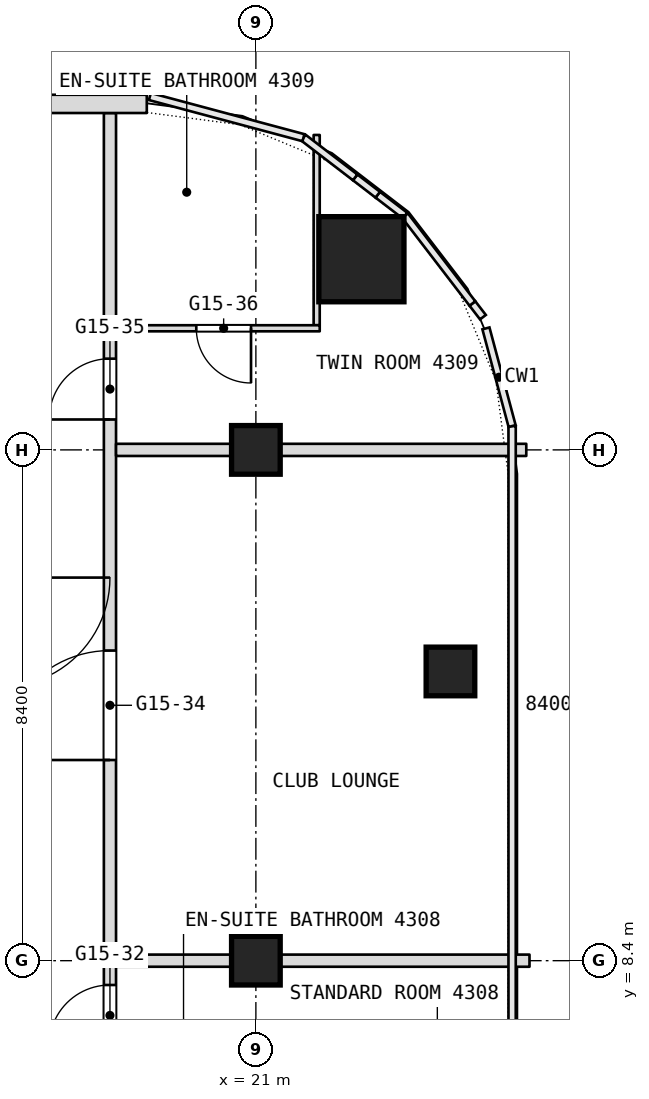
"""IFC4 building model, lengths in metres.
Left out: names, types, materials, properties, quantities, classifications, styles, units other than length and angle.
Written with IfcOpenShell. Run it as: python <this file> out.ifc"""

import sys

from ifc_helpers import new_model, si_unit, direction, frame, frame_2d, origin, origin_2d, place, context, subcontext, project, spatial, rectangle, extrude, element, fill, save


model = new_model("IFC4")
c1 = context("Model", 3, precision=1e-05, world=origin(), true_north=direction((0.0, 1.0)))
c2 = subcontext(c1, "Body", "Model", "MODEL_VIEW")
j1 = project(units=[si_unit("LENGTHUNIT", "METRE"), si_unit("PLANEANGLEUNIT", "RADIAN")], contexts=[c1])
p1 = place(None, origin())
s1 = spatial("IfcSite", under=j1, at=p1, CompositionType="ELEMENT")
p2 = place(p1, origin())
s2 = spatial("IfcBuilding", under=s1, at=p2, CompositionType="ELEMENT")
p3 = place(p2, frame((0.0, 0.0, 191.3)))
s3 = spatial("IfcBuildingStorey", under=s2, at=p3, CompositionType="ELEMENT", Elevation=191.3)
p4 = place(p3, frame((22.736, 19.936, 0.0), z_axis=(0.0, 0.0, 1.0), x_axis=(1.0, 0.0, 0.0)))
e1 = element("IfcColumn", 1, at=p4, inside=s3, PredefinedType="COLUMN", context=c2, shape_type="SweptSolid", body=[
    extrude(rectangle(XDim=1.4, YDim=1.4, at=origin_2d()), origin(), (0.0, 0.0, 1.0), 3.6),
])
for number, where, z_axis, x_axis in (
    (2, (21.0, 8.4, 0.0), (0.0, 0.0, 1.0), (1.0, 0.0, 0.0)),
    (3, (21.0, 16.8, 0.0), (0.0, 0.0, 1.0), (1.0, 0.0, 0.0)),
    (4, (24.2, 13.156, 0.0), (0.0, 0.0, 1.0), (1.0, 0.0, 0.0)),
):
    element("IfcColumn", number, at=place(p3, frame(where, z_axis=z_axis, x_axis=x_axis)), inside=s3, PredefinedType="COLUMN", context=c2, shape_type="SweptSolid", body=[
        extrude(rectangle(XDim=0.8, YDim=0.8, at=origin_2d()), origin(), (0.0, 0.0, 1.0), 3.6),
    ])
p5 = place(p3, frame((22.0, 18.85, 0.0), z_axis=(0.0, 0.0, 1.0), x_axis=(0.0, 1.0, 0.0)))
e5 = element("IfcWall", 5, at=p5, inside=s3, PredefinedType="PARTITIONING", context=c2, shape_type="SweptSolid", body=[
    extrude(rectangle(XDim=3.129, YDim=0.1, at=frame_2d((1.564, 0.0))), origin(), (0.0, 0.0, 1.0), 3.34),
])
p6 = place(p3, frame((18.6, -26.751, 0.0), z_axis=(0.0, 0.0, 1.0), x_axis=(0.0, 1.0, 0.0)))
e6 = element("IfcWall", 6, at=p6, inside=s3, PredefinedType="PARTITIONING", context=c2, shape_type="SweptSolid", body=[
    extrude(rectangle(XDim=49.091, YDim=0.2, at=frame_2d((24.545, 0.0))), origin(), (0.0, 0.0, 1.0), 3.34),
])
p7 = place(p6, frame((3.413, 0.0, 0.0)))
e7 = element("IfcOpeningElement", 7, at=p7, cuts=e6, PredefinedType="OPENING", context=c2, shape_type="SweptSolid", body=[
    extrude(rectangle(XDim=1.0, YDim=2.1, at=frame_2d((0.5, 1.05))), frame((0.0, 0.1, 0.0), z_axis=(0.0, -1.0, 0.0), x_axis=(1.0, 0.0, 0.0)), (0.0, 0.0, 1.0), 0.2),
])
p8 = place(p6, frame((5.838, 0.0, 0.0)))
e8 = element("IfcOpeningElement", 8, at=p8, cuts=e6, PredefinedType="OPENING", context=c2, shape_type="SweptSolid", body=[
    extrude(rectangle(XDim=1.0, YDim=2.1, at=frame_2d((0.5, 1.05))), frame((0.0, 0.1, 0.0), z_axis=(0.0, -1.0, 0.0), x_axis=(1.0, 0.0, 0.0)), (0.0, 0.0, 1.0), 0.2),
])
p9 = place(p6, frame((10.351, 0.0, 0.0)))
e9 = element("IfcOpeningElement", 9, at=p9, cuts=e6, PredefinedType="OPENING", context=c2, shape_type="SweptSolid", body=[
    extrude(rectangle(XDim=1.0, YDim=2.1, at=frame_2d((0.5, 1.05))), frame((0.0, 0.1, 0.0), z_axis=(0.0, -1.0, 0.0), x_axis=(1.0, 0.0, 0.0)), (0.0, 0.0, 1.0), 0.2),
])
p10 = place(p6, frame((16.951, 0.0, 0.0)))
e10 = element("IfcOpeningElement", 10, at=p10, cuts=e6, PredefinedType="OPENING", context=c2, shape_type="SweptSolid", body=[
    extrude(rectangle(XDim=1.0, YDim=2.1, at=frame_2d((0.5, 1.05))), frame((0.0, 0.1, 0.0), z_axis=(0.0, -1.0, 0.0), x_axis=(1.0, 0.0, 0.0)), (0.0, 0.0, 1.0), 0.2),
])
p11 = place(p6, frame((21.151, 0.0, 0.0)))
e11 = element("IfcOpeningElement", 11, at=p11, cuts=e6, PredefinedType="OPENING", context=c2, shape_type="SweptSolid", body=[
    extrude(rectangle(XDim=1.0, YDim=2.1, at=frame_2d((0.5, 1.05))), frame((0.0, 0.1, 0.0), z_axis=(0.0, -1.0, 0.0), x_axis=(1.0, 0.0, 0.0)), (0.0, 0.0, 1.0), 0.2),
])
p12 = place(p6, frame((22.951, 0.0, 0.0)))
e12 = element("IfcOpeningElement", 12, at=p12, cuts=e6, PredefinedType="OPENING", context=c2, shape_type="SweptSolid", body=[
    extrude(rectangle(XDim=1.0, YDim=2.1, at=frame_2d((0.5, 1.05))), frame((0.0, 0.1, 0.0), z_axis=(0.0, -1.0, 0.0), x_axis=(1.0, 0.0, 0.0)), (0.0, 0.0, 1.0), 0.2),
])
p13 = place(p6, frame((27.151, 0.0, 0.0)))
e13 = element("IfcOpeningElement", 13, at=p13, cuts=e6, PredefinedType="OPENING", context=c2, shape_type="SweptSolid", body=[
    extrude(rectangle(XDim=1.0, YDim=2.1, at=frame_2d((0.5, 1.05))), frame((0.0, 0.1, 0.0), z_axis=(0.0, -1.0, 0.0), x_axis=(1.0, 0.0, 0.0)), (0.0, 0.0, 1.0), 0.2),
])
p14 = place(p6, frame((33.751, 0.0, 0.0)))
e14 = element("IfcOpeningElement", 14, at=p14, cuts=e6, PredefinedType="OPENING", context=c2, shape_type="SweptSolid", body=[
    extrude(rectangle(XDim=1.0, YDim=2.1, at=frame_2d((0.5, 1.05))), frame((0.0, 0.1, 0.0), z_axis=(0.0, -1.0, 0.0), x_axis=(1.0, 0.0, 0.0)), (0.0, 0.0, 1.0), 0.2),
])
p15 = place(p6, frame((38.451, 0.0, 0.0)))
e15 = element("IfcOpeningElement", 15, at=p15, cuts=e6, PredefinedType="OPENING", context=c2, shape_type="SweptSolid", body=[
    extrude(rectangle(XDim=1.8, YDim=2.1, at=frame_2d((0.9, 1.05))), frame((0.0, 0.1, 0.0), z_axis=(0.0, -1.0, 0.0), x_axis=(1.0, 0.0, 0.0)), (0.0, 0.0, 1.0), 0.2),
])
p16 = place(p6, frame((44.051, 0.0, 0.0)))
e16 = element("IfcOpeningElement", 16, at=p16, cuts=e6, PredefinedType="OPENING", context=c2, shape_type="SweptSolid", body=[
    extrude(rectangle(XDim=1.0, YDim=2.1, at=frame_2d((0.5, 1.05))), frame((0.0, 0.1, 0.0), z_axis=(0.0, -1.0, 0.0), x_axis=(1.0, 0.0, 0.0)), (0.0, 0.0, 1.0), 0.2),
])
p17 = place(p3, frame((18.7, 8.4, 0.0), z_axis=(0.0, 0.0, 1.0), x_axis=(1.0, 0.0, 0.0)))
e17 = element("IfcWall", 17, at=p17, inside=s3, PredefinedType="PARTITIONING", context=c2, shape_type="SweptSolid", body=[
    extrude(rectangle(XDim=6.8, YDim=0.2, at=frame_2d((3.4, 0.0))), origin(), (0.0, 0.0, 1.0), 2.94),
])
p18 = place(p3, frame((18.7, 16.8, 0.0), z_axis=(0.0, 0.0, 1.0), x_axis=(1.0, 0.0, 0.0)))
e18 = element("IfcWall", 18, at=p18, inside=s3, PredefinedType="PARTITIONING", context=c2, shape_type="SweptSolid", body=[
    extrude(rectangle(XDim=6.747, YDim=0.2, at=frame_2d((3.374, 0.0))), origin(), (0.0, 0.0, 1.0), 2.94),
])
p19 = place(p3, frame((18.7, 18.8, 0.0), z_axis=(0.0, 0.0, 1.0), x_axis=(1.0, 0.0, 0.0)))
e19 = element("IfcWall", 19, at=p19, inside=s3, PredefinedType="PARTITIONING", context=c2, shape_type="SweptSolid", body=[
    extrude(rectangle(XDim=3.35, YDim=0.1, at=frame_2d((1.675, 0.0))), origin(), (0.0, 0.0, 1.0), 3.34),
])
p20 = place(p19, frame((1.32, 0.0, 0.0)))
e20 = element("IfcOpeningElement", 20, at=p20, cuts=e19, PredefinedType="OPENING", context=c2, shape_type="SweptSolid", body=[
    extrude(rectangle(XDim=0.9, YDim=2.1, at=frame_2d((0.45, 1.05))), frame((0.0, 0.05, 0.0), z_axis=(0.0, -1.0, 0.0), x_axis=(1.0, 0.0, 0.0)), (0.0, 0.0, 1.0), 0.1),
])
p21 = place(p3, frame((19.206, 22.49, 0.0), z_axis=(0.0, 0.0, 1.0), x_axis=(-1.0, 0.0, 0.0)))
e21 = element("IfcWall", 21, at=p21, inside=s3, PredefinedType="NOTDEFINED", context=c2, shape_type="SweptSolid", body=[
    extrude(rectangle(XDim=38.412, YDim=0.3, at=frame_2d((19.206, 0.0))), origin(), (0.0, 0.0, 1.0), 3.6),
])
p22 = place(p21, frame((3.306, 0.0, 0.9)))
e22 = element("IfcOpeningElement", 22, at=p22, cuts=e21, PredefinedType="OPENING", context=c2, shape_type="SweptSolid", body=[
    extrude(rectangle(XDim=2.4, YDim=2.1, at=frame_2d((1.2, 1.05))), frame((0.0, 0.15, 0.0), z_axis=(0.0, -1.0, 0.0), x_axis=(1.0, 0.0, 0.0)), (0.0, 0.0, 1.0), 0.3),
])
p23 = place(p21, frame((7.506, 0.0, 0.9)))
e23 = element("IfcOpeningElement", 23, at=p23, cuts=e21, PredefinedType="OPENING", context=c2, shape_type="SweptSolid", body=[
    extrude(rectangle(XDim=2.4, YDim=2.1, at=frame_2d((1.2, 1.05))), frame((0.0, 0.15, 0.0), z_axis=(0.0, -1.0, 0.0), x_axis=(1.0, 0.0, 0.0)), (0.0, 0.0, 1.0), 0.3),
])
p24 = place(p21, frame((11.706, 0.0, 0.9)))
e24 = element("IfcOpeningElement", 24, at=p24, cuts=e21, PredefinedType="OPENING", context=c2, shape_type="SweptSolid", body=[
    extrude(rectangle(XDim=2.4, YDim=2.1, at=frame_2d((1.2, 1.05))), frame((0.0, 0.15, 0.0), z_axis=(0.0, -1.0, 0.0), x_axis=(1.0, 0.0, 0.0)), (0.0, 0.0, 1.0), 0.3),
])
p25 = place(p21, frame((15.906, 0.0, 0.9)))
e25 = element("IfcOpeningElement", 25, at=p25, cuts=e21, PredefinedType="OPENING", context=c2, shape_type="SweptSolid", body=[
    extrude(rectangle(XDim=2.4, YDim=2.1, at=frame_2d((1.2, 1.05))), frame((0.0, 0.15, 0.0), z_axis=(0.0, -1.0, 0.0), x_axis=(1.0, 0.0, 0.0)), (0.0, 0.0, 1.0), 0.3),
])
p26 = place(p21, frame((20.106, 0.0, 0.9)))
e26 = element("IfcOpeningElement", 26, at=p26, cuts=e21, PredefinedType="OPENING", context=c2, shape_type="SweptSolid", body=[
    extrude(rectangle(XDim=2.4, YDim=2.1, at=frame_2d((1.2, 1.05))), frame((0.0, 0.15, 0.0), z_axis=(0.0, -1.0, 0.0), x_axis=(1.0, 0.0, 0.0)), (0.0, 0.0, 1.0), 0.3),
])
p27 = place(p21, frame((24.306, 0.0, 0.9)))
e27 = element("IfcOpeningElement", 27, at=p27, cuts=e21, PredefinedType="OPENING", context=c2, shape_type="SweptSolid", body=[
    extrude(rectangle(XDim=2.4, YDim=2.1, at=frame_2d((1.2, 1.05))), frame((0.0, 0.15, 0.0), z_axis=(0.0, -1.0, 0.0), x_axis=(1.0, 0.0, 0.0)), (0.0, 0.0, 1.0), 0.3),
])
p28 = place(p21, frame((28.506, 0.0, 0.9)))
e28 = element("IfcOpeningElement", 28, at=p28, cuts=e21, PredefinedType="OPENING", context=c2, shape_type="SweptSolid", body=[
    extrude(rectangle(XDim=2.4, YDim=2.1, at=frame_2d((1.2, 1.05))), frame((0.0, 0.15, 0.0), z_axis=(0.0, -1.0, 0.0), x_axis=(1.0, 0.0, 0.0)), (0.0, 0.0, 1.0), 0.3),
])
p29 = place(p21, frame((32.706, 0.0, 0.9)))
e29 = element("IfcOpeningElement", 29, at=p29, cuts=e21, PredefinedType="OPENING", context=c2, shape_type="SweptSolid", body=[
    extrude(rectangle(XDim=2.4, YDim=2.1, at=frame_2d((1.2, 1.05))), frame((0.0, 0.15, 0.0), z_axis=(0.0, -1.0, 0.0), x_axis=(1.0, 0.0, 0.0)), (0.0, 0.0, 1.0), 0.3),
])
p30 = place(p14, origin())
e30 = element("IfcDoor", 30, at=p30, inside=s3, OperationType="SINGLE_SWING_RIGHT", PredefinedType="DOOR", context=c2, shape_type="SweptSolid", body=[
    extrude(rectangle(XDim=1.0, YDim=2.1, at=frame_2d((0.5, 1.05))), frame((0.0, 0.025, 0.0), z_axis=(0.0, -1.0, 0.0), x_axis=(1.0, 0.0, 0.0)), (0.0, 0.0, 1.0), 0.05),
])
fill(e14, e30)
p31 = place(p15, origin())
e31 = element("IfcDoor", 31, at=p31, inside=s3, OperationType="DOUBLE_DOOR_SINGLE_SWING", PredefinedType="DOOR", context=c2, shape_type="SweptSolid", body=[
    extrude(rectangle(XDim=1.8, YDim=2.1, at=frame_2d((0.9, 1.05))), frame((0.0, 0.025, 0.0), z_axis=(0.0, -1.0, 0.0), x_axis=(1.0, 0.0, 0.0)), (0.0, 0.0, 1.0), 0.05),
])
fill(e15, e31)
p32 = place(p16, origin())
e32 = element("IfcDoor", 32, at=p32, inside=s3, OperationType="SINGLE_SWING_LEFT", PredefinedType="DOOR", context=c2, shape_type="SweptSolid", body=[
    extrude(rectangle(XDim=1.0, YDim=2.1, at=frame_2d((0.5, 1.05))), frame((0.0, 0.025, 0.0), z_axis=(0.0, -1.0, 0.0), x_axis=(1.0, 0.0, 0.0)), (0.0, 0.0, 1.0), 0.05),
])
fill(e16, e32)
p33 = place(p20, origin())
e33 = element("IfcDoor", 33, at=p33, inside=s3, OperationType="SINGLE_SWING_RIGHT", PredefinedType="DOOR", context=c2, shape_type="SweptSolid", body=[
    extrude(rectangle(XDim=0.9, YDim=2.1, at=frame_2d((0.45, 1.05))), frame((0.0, 0.025, 0.0), z_axis=(0.0, -1.0, 0.0), x_axis=(1.0, 0.0, 0.0)), (0.0, 0.0, 1.0), 0.05),
])
fill(e20, e33)
save(model, sys.argv[1])
